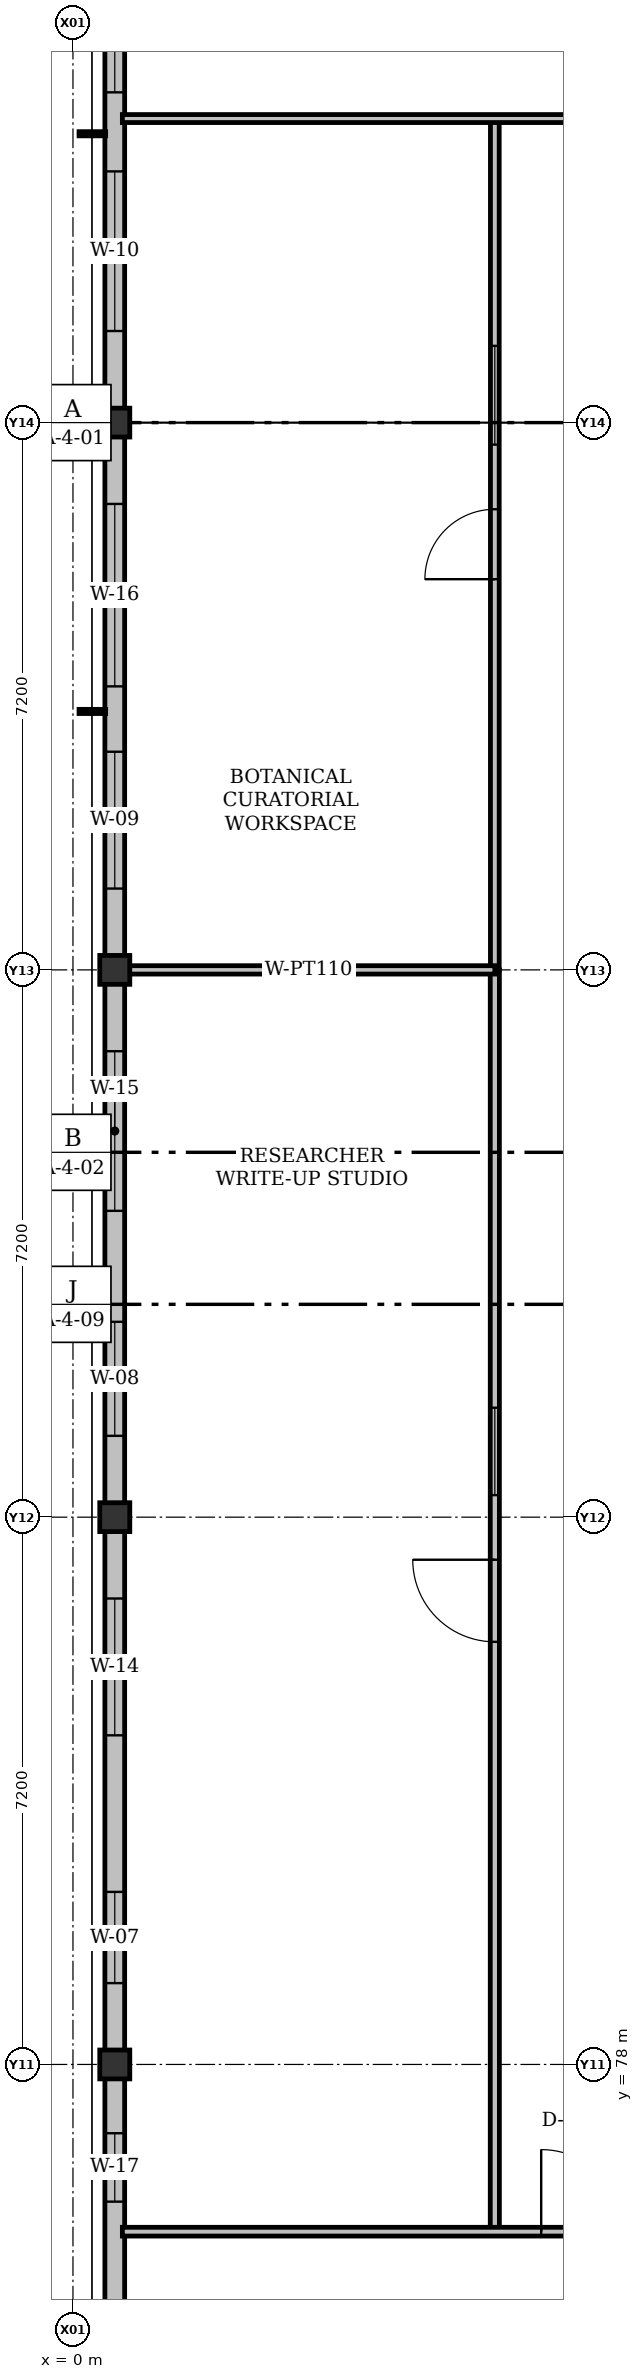
"""IFC4 building model, lengths in metres.
Left out: names, types, materials, properties, quantities, classifications, styles, units other than length and angle.
Written with IfcOpenShell. Run it as: python <this file> out.ifc"""

import sys

from ifc_helpers import new_model, si_unit, direction, frame, frame_2d, origin, origin_2d, place, context, subcontext, project, spatial, rectangle, i_section, extrude, element, fill, save


model = new_model("IFC4")
c1 = context("Model", 3, precision=1e-05, world=origin(), true_north=direction((0.0, 1.0)))
c2 = subcontext(c1, "Body", "Model", "MODEL_VIEW")
j1 = project(units=[si_unit("LENGTHUNIT", "METRE"), si_unit("PLANEANGLEUNIT", "RADIAN")], contexts=[c1])
p1 = place(None, origin())
s1 = spatial("IfcSite", under=j1, at=p1, CompositionType="ELEMENT")
p2 = place(p1, origin())
s2 = spatial("IfcBuilding", under=s1, at=p2, CompositionType="ELEMENT")
p3 = place(p2, frame((0.0, 0.0, 18.3)))
s3 = spatial("IfcBuildingStorey", under=s2, at=p3, CompositionType="ELEMENT", Elevation=18.3)
for number, where, z_axis, x_axis in (
    (1, (0.55, 78.0, 0.0), (0.0, 0.0, 1.0), (1.0, 0.0, 0.0)),
    (2, (0.55, 85.2, 0.0), (0.0, 0.0, 1.0), (1.0, 0.0, 0.0)),
    (3, (0.55, 92.4, 0.0), (0.0, 0.0, 1.0), (1.0, 0.0, 0.0)),
    (4, (0.55, 99.6, 0.0), (0.0, 0.0, 1.0), (1.0, 0.0, 0.0)),
):
    element("IfcColumn", number, at=place(p3, frame(where, z_axis=z_axis, x_axis=x_axis)), inside=s3, PredefinedType="COLUMN", context=c2, shape_type="SweptSolid", body=[
        extrude(i_section(OverallWidth=0.395, OverallDepth=0.38, WebThickness=0.019, FlangeThickness=0.03, FilletRadius=0.015, at=origin_2d()), origin(), (0.0, 0.0, 1.0), 4.2),
    ])
p4 = place(p3, frame((0.55, 70.5, 0.0), z_axis=(0.0, 0.0, 1.0), x_axis=(0.0, 1.0, 0.0)))
e5 = element("IfcWall", 5, at=p4, inside=s3, PredefinedType="SOLIDWALL", context=c2, shape_type="SweptSolid", body=[
    extrude(rectangle(XDim=7.5, YDim=0.26, at=frame_2d((3.75, 0.0))), origin(), (0.0, 0.0, 1.0), 3.577),
])
p5 = place(p4, frame((1.855, 0.0, 0.92)))
e6 = element("IfcOpeningElement", 6, at=p5, cuts=e5, PredefinedType="OPENING", context=c2, shape_type="SweptSolid", body=[
    extrude(rectangle(XDim=2.1, YDim=1.4, at=frame_2d((1.05, 0.7))), frame((0.0, 0.13, 0.0), z_axis=(0.0, -1.0, 0.0), x_axis=(1.0, 0.0, 0.0)), (0.0, 0.0, 1.0), 0.26),
])
p6 = place(p4, frame((5.695, 0.0, 0.92)))
e7 = element("IfcOpeningElement", 7, at=p6, cuts=e5, PredefinedType="OPENING", context=c2, shape_type="SweptSolid", body=[
    extrude(rectangle(XDim=0.9, YDim=1.3, at=frame_2d((0.45, 0.65))), frame((0.0, 0.13, 0.0), z_axis=(0.0, -1.0, 0.0), x_axis=(1.0, 0.0, 0.0)), (0.0, 0.0, 1.0), 0.26),
])
p7 = place(p3, frame((0.55, 78.0, 0.0), z_axis=(0.0, 0.0, 1.0), x_axis=(0.0, 1.0, 0.0)))
e8 = element("IfcWall", 8, at=p7, inside=s3, PredefinedType="SOLIDWALL", context=c2, shape_type="SweptSolid", body=[
    extrude(rectangle(XDim=7.2, YDim=0.26, at=frame_2d((3.6, 0.0))), origin(), (0.0, 0.0, 1.0), 3.577),
])
p8 = place(p7, frame((1.07, 0.0, 0.92)))
e9 = element("IfcOpeningElement", 9, at=p8, cuts=e8, PredefinedType="OPENING", context=c2, shape_type="SweptSolid", body=[
    extrude(rectangle(XDim=1.2, YDim=1.55, at=frame_2d((0.6, 0.775))), frame((0.0, 0.13, 0.0), z_axis=(0.0, -1.0, 0.0), x_axis=(1.0, 0.0, 0.0)), (0.0, 0.0, 1.0), 0.26),
])
p9 = place(p7, frame((4.33, 0.0, 0.92)))
e10 = element("IfcOpeningElement", 10, at=p9, cuts=e8, PredefinedType="OPENING", context=c2, shape_type="SweptSolid", body=[
    extrude(rectangle(XDim=1.8, YDim=1.7, at=frame_2d((0.9, 0.85))), frame((0.0, 0.13, 0.0), z_axis=(0.0, -1.0, 0.0), x_axis=(1.0, 0.0, 0.0)), (0.0, 0.0, 1.0), 0.26),
])
p10 = place(p3, frame((0.55, 85.2, 0.0), z_axis=(0.0, 0.0, 1.0), x_axis=(0.0, 1.0, 0.0)))
e11 = element("IfcWall", 11, at=p10, inside=s3, PredefinedType="SOLIDWALL", context=c2, shape_type="SweptSolid", body=[
    extrude(rectangle(XDim=7.2, YDim=0.26, at=frame_2d((3.6, 0.0))), origin(), (0.0, 0.0, 1.0), 3.577),
])
p11 = place(p10, frame((1.07, 0.0, 0.92)))
e12 = element("IfcOpeningElement", 12, at=p11, cuts=e11, PredefinedType="OPENING", context=c2, shape_type="SweptSolid", body=[
    extrude(rectangle(XDim=1.5, YDim=1.55, at=frame_2d((0.75, 0.775))), frame((0.0, 0.13, 0.0), z_axis=(0.0, -1.0, 0.0), x_axis=(1.0, 0.0, 0.0)), (0.0, 0.0, 1.0), 0.26),
])
p12 = place(p10, frame((4.03, 0.0, 0.92)))
e13 = element("IfcOpeningElement", 13, at=p12, cuts=e11, PredefinedType="OPENING", context=c2, shape_type="SweptSolid", body=[
    extrude(rectangle(XDim=2.1, YDim=1.7, at=frame_2d((1.05, 0.85))), frame((0.0, 0.13, 0.0), z_axis=(0.0, -1.0, 0.0), x_axis=(1.0, 0.0, 0.0)), (0.0, 0.0, 1.0), 0.26),
])
p13 = place(p3, frame((0.55, 92.4, 0.0), z_axis=(0.0, 0.0, 1.0), x_axis=(0.0, 1.0, 0.0)))
e14 = element("IfcWall", 14, at=p13, inside=s3, PredefinedType="SOLIDWALL", context=c2, shape_type="SweptSolid", body=[
    extrude(rectangle(XDim=7.2, YDim=0.26, at=frame_2d((3.6, 0.0))), origin(), (0.0, 0.0, 1.0), 3.577),
])
p14 = place(p13, frame((1.07, 0.0, 0.92)))
e15 = element("IfcOpeningElement", 15, at=p14, cuts=e14, PredefinedType="OPENING", context=c2, shape_type="SweptSolid", body=[
    extrude(rectangle(XDim=1.8, YDim=1.55, at=frame_2d((0.9, 0.775))), frame((0.0, 0.13, 0.0), z_axis=(0.0, -1.0, 0.0), x_axis=(1.0, 0.0, 0.0)), (0.0, 0.0, 1.0), 0.26),
])
p15 = place(p13, frame((3.73, 0.0, 0.92)))
e16 = element("IfcOpeningElement", 16, at=p15, cuts=e14, PredefinedType="OPENING", context=c2, shape_type="SweptSolid", body=[
    extrude(rectangle(XDim=2.4, YDim=1.7, at=frame_2d((1.2, 0.85))), frame((0.0, 0.13, 0.0), z_axis=(0.0, -1.0, 0.0), x_axis=(1.0, 0.0, 0.0)), (0.0, 0.0, 1.0), 0.26),
])
p16 = place(p3, frame((0.55, 99.6, 0.0), z_axis=(0.0, 0.0, 1.0), x_axis=(0.0, 1.0, 0.0)))
e17 = element("IfcWall", 17, at=p16, inside=s3, PredefinedType="SOLIDWALL", context=c2, shape_type="SweptSolid", body=[
    extrude(rectangle(XDim=7.2, YDim=0.26, at=frame_2d((3.6, 0.0))), origin(), (0.0, 0.0, 1.0), 3.577),
])
p17 = place(p16, frame((1.205, 0.0, 0.92)))
e18 = element("IfcOpeningElement", 18, at=p17, cuts=e17, PredefinedType="OPENING", context=c2, shape_type="SweptSolid", body=[
    extrude(rectangle(XDim=2.1, YDim=1.55, at=frame_2d((1.05, 0.775))), frame((0.0, 0.13, 0.0), z_axis=(0.0, -1.0, 0.0), x_axis=(1.0, 0.0, 0.0)), (0.0, 0.0, 1.0), 0.26),
])
p18 = place(p16, frame((4.345, 0.0, 0.92)))
e19 = element("IfcOpeningElement", 19, at=p18, cuts=e17, PredefinedType="OPENING", context=c2, shape_type="SweptSolid", body=[
    extrude(rectangle(XDim=2.0, YDim=1.35, at=frame_2d((1.0, 0.675))), frame((0.0, 0.13, 0.0), z_axis=(0.0, -1.0, 0.0), x_axis=(1.0, 0.0, 0.0)), (0.0, 0.0, 1.0), 0.26),
])
p19 = place(p3, frame((5.55, 75.8, 0.0), z_axis=(0.0, 0.0, 1.0), x_axis=(0.0, 1.0, 0.0)))
e20 = element("IfcWall", 20, at=p19, inside=s3, PredefinedType="PARTITIONING", context=c2, shape_type="SweptSolid", body=[
    extrude(rectangle(XDim=16.6, YDim=0.12, at=frame_2d((8.3, 0.0))), origin(), (0.0, 0.0, 1.0), 3.451),
])
p20 = place(p19, frame((7.76, 0.0, 0.0)))
e21 = element("IfcOpeningElement", 21, at=p20, cuts=e20, PredefinedType="OPENING", context=c2, shape_type="SweptSolid", body=[
    extrude(rectangle(XDim=1.08, YDim=2.1, at=frame_2d((0.54, 1.05))), frame((0.0, 0.06, 0.0), z_axis=(0.0, -1.0, 0.0), x_axis=(1.0, 0.0, 0.0)), (0.0, 0.0, 1.0), 0.12),
])
p21 = place(p19, frame((9.69, 0.0, 0.92)))
e22 = element("IfcOpeningElement", 22, at=p21, cuts=e20, PredefinedType="OPENING", context=c2, shape_type="SweptSolid", body=[
    extrude(rectangle(XDim=1.15, YDim=1.3, at=frame_2d((0.575, 0.65))), frame((0.0, 0.06, 0.0), z_axis=(0.0, -1.0, 0.0), x_axis=(1.0, 0.0, 0.0)), (0.0, 0.0, 1.0), 0.12),
])
p22 = place(p3, frame((5.55, 92.4, 0.0), z_axis=(0.0, 0.0, 1.0), x_axis=(0.0, 1.0, 0.0)))
e23 = element("IfcWall", 23, at=p22, inside=s3, PredefinedType="PARTITIONING", context=c2, shape_type="SweptSolid", body=[
    extrude(rectangle(XDim=11.2, YDim=0.115, at=frame_2d((5.6, 0.0))), origin(), (0.0, 0.0, 1.0), 3.451),
])
p23 = place(p22, frame((5.14, 0.0, 0.0)))
e24 = element("IfcOpeningElement", 24, at=p23, cuts=e23, PredefinedType="OPENING", context=c2, shape_type="SweptSolid", body=[
    extrude(rectangle(XDim=0.92, YDim=2.15, at=frame_2d((0.46, 1.075))), frame((0.0, 0.058, 0.0), z_axis=(0.0, -1.0, 0.0), x_axis=(1.0, 0.0, 0.0)), (0.0, 0.0, 1.0), 0.115),
])
p24 = place(p22, frame((6.91, 0.0, 0.92)))
e25 = element("IfcOpeningElement", 25, at=p24, cuts=e23, PredefinedType="OPENING", context=c2, shape_type="SweptSolid", body=[
    extrude(rectangle(XDim=1.3, YDim=1.3, at=frame_2d((0.65, 0.65))), frame((0.0, 0.058, 0.0), z_axis=(0.0, -1.0, 0.0), x_axis=(1.0, 0.0, 0.0)), (0.0, 0.0, 1.0), 0.115),
])
p25 = place(p3, frame((0.65, 92.4, 0.0), z_axis=(0.0, 0.0, 1.0), x_axis=(1.0, 0.0, 0.0)))
e26 = element("IfcWall", 26, at=p25, inside=s3, PredefinedType="PARTITIONING", context=c2, shape_type="SweptSolid", body=[
    extrude(rectangle(XDim=4.9, YDim=0.11, at=frame_2d((2.45, 0.0))), origin(), (0.0, 0.0, 1.0), 3.451),
])
p26 = place(p3, frame((0.65, 103.6, 0.0), z_axis=(0.0, 0.0, 1.0), x_axis=(1.0, 0.0, 0.0)))
e27 = element("IfcWall", 27, at=p26, inside=s3, PredefinedType="PARTITIONING", context=c2, shape_type="SweptSolid", body=[
    extrude(rectangle(XDim=28.265, YDim=0.105, at=frame_2d((14.133, 0.0))), origin(), (0.0, 0.0, 1.0), 3.527),
])
p27 = place(p26, frame((9.47, 0.0, 0.0)))
e28 = element("IfcOpeningElement", 28, at=p27, cuts=e27, PredefinedType="OPENING", context=c2, shape_type="SweptSolid", body=[
    extrude(rectangle(XDim=0.96, YDim=2.15, at=frame_2d((0.48, 1.075))), frame((0.0, 0.052, 0.0), z_axis=(0.0, -1.0, 0.0), x_axis=(1.0, 0.0, 0.0)), (0.0, 0.0, 1.0), 0.105),
])
p28 = place(p26, frame((11.28, 0.0, 0.92)))
e29 = element("IfcOpeningElement", 29, at=p28, cuts=e27, PredefinedType="OPENING", context=c2, shape_type="SweptSolid", body=[
    extrude(rectangle(XDim=1.45, YDim=1.3, at=frame_2d((0.725, 0.65))), frame((0.0, 0.052, 0.0), z_axis=(0.0, -1.0, 0.0), x_axis=(1.0, 0.0, 0.0)), (0.0, 0.0, 1.0), 0.105),
])
p29 = place(p3, frame((0.65, 75.8, 0.0), z_axis=(0.0, 0.0, 1.0), x_axis=(1.0, 0.0, 0.0)))
e30 = element("IfcWall", 30, at=p29, inside=s3, PredefinedType="PARTITIONING", context=c2, shape_type="SweptSolid", body=[
    extrude(rectangle(XDim=7.2, YDim=0.115, at=frame_2d((3.6, 0.0))), origin(), (0.0, 0.0, 1.0), 3.527),
])
p30 = place(p29, frame((5.51, 0.0, 0.0)))
e31 = element("IfcOpeningElement", 31, at=p30, cuts=e30, PredefinedType="OPENING", context=c2, shape_type="SweptSolid", body=[
    extrude(rectangle(XDim=1.08, YDim=2.15, at=frame_2d((0.54, 1.075))), frame((0.0, 0.058, 0.0), z_axis=(0.0, -1.0, 0.0), x_axis=(1.0, 0.0, 0.0)), (0.0, 0.0, 1.0), 0.115),
])
p31 = place(p6, origin())
e32 = element("IfcWindow", 32, at=p31, inside=s3, PartitioningType="SINGLE_PANEL", PredefinedType="WINDOW", context=c2, shape_type="SweptSolid", body=[
    extrude(rectangle(XDim=0.9, YDim=1.3, at=frame_2d((0.45, 0.65))), frame((0.0, 0.03, 0.0), z_axis=(0.0, -1.0, 0.0), x_axis=(1.0, 0.0, 0.0)), (0.0, 0.0, 1.0), 0.06),
])
fill(e7, e32)
p32 = place(p8, origin())
e33 = element("IfcWindow", 33, at=p32, inside=s3, PartitioningType="SINGLE_PANEL", PredefinedType="WINDOW", context=c2, shape_type="SweptSolid", body=[
    extrude(rectangle(XDim=1.2, YDim=1.55, at=frame_2d((0.6, 0.775))), frame((0.0, 0.03, 0.0), z_axis=(0.0, -1.0, 0.0), x_axis=(1.0, 0.0, 0.0)), (0.0, 0.0, 1.0), 0.06),
])
fill(e9, e33)
p33 = place(p9, origin())
e34 = element("IfcWindow", 34, at=p33, inside=s3, PartitioningType="DOUBLE_PANEL_VERTICAL", PredefinedType="WINDOW", context=c2, shape_type="SweptSolid", body=[
    extrude(rectangle(XDim=1.8, YDim=1.7, at=frame_2d((0.9, 0.85))), frame((0.0, 0.03, 0.0), z_axis=(0.0, -1.0, 0.0), x_axis=(1.0, 0.0, 0.0)), (0.0, 0.0, 1.0), 0.06),
])
fill(e10, e34)
p34 = place(p11, origin())
e35 = element("IfcWindow", 35, at=p34, inside=s3, PartitioningType="SINGLE_PANEL", PredefinedType="WINDOW", context=c2, shape_type="SweptSolid", body=[
    extrude(rectangle(XDim=1.5, YDim=1.55, at=frame_2d((0.75, 0.775))), frame((0.0, 0.03, 0.0), z_axis=(0.0, -1.0, 0.0), x_axis=(1.0, 0.0, 0.0)), (0.0, 0.0, 1.0), 0.06),
])
fill(e12, e35)
p35 = place(p12, origin())
e36 = element("IfcWindow", 36, at=p35, inside=s3, PartitioningType="DOUBLE_PANEL_VERTICAL", PredefinedType="WINDOW", context=c2, shape_type="SweptSolid", body=[
    extrude(rectangle(XDim=2.1, YDim=1.7, at=frame_2d((1.05, 0.85))), frame((0.0, 0.03, 0.0), z_axis=(0.0, -1.0, 0.0), x_axis=(1.0, 0.0, 0.0)), (0.0, 0.0, 1.0), 0.06),
])
fill(e13, e36)
p36 = place(p14, origin())
e37 = element("IfcWindow", 37, at=p36, inside=s3, PartitioningType="DOUBLE_PANEL_VERTICAL", PredefinedType="WINDOW", context=c2, shape_type="SweptSolid", body=[
    extrude(rectangle(XDim=1.8, YDim=1.55, at=frame_2d((0.9, 0.775))), frame((0.0, 0.03, 0.0), z_axis=(0.0, -1.0, 0.0), x_axis=(1.0, 0.0, 0.0)), (0.0, 0.0, 1.0), 0.06),
])
fill(e15, e37)
p37 = place(p15, origin())
e38 = element("IfcWindow", 38, at=p37, inside=s3, PartitioningType="DOUBLE_PANEL_VERTICAL", PredefinedType="WINDOW", context=c2, shape_type="SweptSolid", body=[
    extrude(rectangle(XDim=2.4, YDim=1.7, at=frame_2d((1.2, 0.85))), frame((0.0, 0.03, 0.0), z_axis=(0.0, -1.0, 0.0), x_axis=(1.0, 0.0, 0.0)), (0.0, 0.0, 1.0), 0.06),
])
fill(e16, e38)
p38 = place(p17, origin())
e39 = element("IfcWindow", 39, at=p38, inside=s3, PartitioningType="DOUBLE_PANEL_VERTICAL", PredefinedType="WINDOW", context=c2, shape_type="SweptSolid", body=[
    extrude(rectangle(XDim=2.1, YDim=1.55, at=frame_2d((1.05, 0.775))), frame((0.0, 0.03, 0.0), z_axis=(0.0, -1.0, 0.0), x_axis=(1.0, 0.0, 0.0)), (0.0, 0.0, 1.0), 0.06),
])
fill(e18, e39)
p39 = place(p18, origin())
e40 = element("IfcWindow", 40, at=p39, inside=s3, PartitioningType="DOUBLE_PANEL_VERTICAL", PredefinedType="WINDOW", context=c2, shape_type="SweptSolid", body=[
    extrude(rectangle(XDim=2.0, YDim=1.35, at=frame_2d((1.0, 0.675))), frame((0.0, 0.03, 0.0), z_axis=(0.0, -1.0, 0.0), x_axis=(1.0, 0.0, 0.0)), (0.0, 0.0, 1.0), 0.06),
])
fill(e19, e40)
p40 = place(p20, origin())
e41 = element("IfcDoor", 41, at=p40, inside=s3, OperationType="SINGLE_SWING_RIGHT", PredefinedType="DOOR", context=c2, shape_type="SweptSolid", body=[
    extrude(rectangle(XDim=1.08, YDim=2.1, at=frame_2d((0.54, 1.05))), frame((0.0, 0.025, 0.0), z_axis=(0.0, -1.0, 0.0), x_axis=(1.0, 0.0, 0.0)), (0.0, 0.0, 1.0), 0.05),
])
fill(e21, e41)
p41 = place(p21, origin())
e42 = element("IfcWindow", 42, at=p41, inside=s3, PartitioningType="SINGLE_PANEL", PredefinedType="WINDOW", context=c2, shape_type="SweptSolid", body=[
    extrude(rectangle(XDim=1.15, YDim=1.3, at=frame_2d((0.575, 0.65))), frame((0.0, 0.03, 0.0), z_axis=(0.0, -1.0, 0.0), x_axis=(1.0, 0.0, 0.0)), (0.0, 0.0, 1.0), 0.06),
])
fill(e22, e42)
p42 = place(p23, origin())
e43 = element("IfcDoor", 43, at=p42, inside=s3, OperationType="SINGLE_SWING_LEFT", PredefinedType="DOOR", context=c2, shape_type="SweptSolid", body=[
    extrude(rectangle(XDim=0.92, YDim=2.15, at=frame_2d((0.46, 1.075))), frame((0.0, 0.025, 0.0), z_axis=(0.0, -1.0, 0.0), x_axis=(1.0, 0.0, 0.0)), (0.0, 0.0, 1.0), 0.05),
])
fill(e24, e43)
p43 = place(p24, origin())
e44 = element("IfcWindow", 44, at=p43, inside=s3, PartitioningType="SINGLE_PANEL", PredefinedType="WINDOW", context=c2, shape_type="SweptSolid", body=[
    extrude(rectangle(XDim=1.3, YDim=1.3, at=frame_2d((0.65, 0.65))), frame((0.0, 0.03, 0.0), z_axis=(0.0, -1.0, 0.0), x_axis=(1.0, 0.0, 0.0)), (0.0, 0.0, 1.0), 0.06),
])
fill(e25, e44)
p44 = place(p30, origin())
e45 = element("IfcDoor", 45, at=p44, inside=s3, OperationType="SINGLE_SWING_LEFT", PredefinedType="DOOR", context=c2, shape_type="SweptSolid", body=[
    extrude(rectangle(XDim=1.08, YDim=2.15, at=frame_2d((0.54, 1.075))), frame((0.0, 0.025, 0.0), z_axis=(0.0, -1.0, 0.0), x_axis=(1.0, 0.0, 0.0)), (0.0, 0.0, 1.0), 0.05),
])
fill(e31, e45)
save(model, sys.argv[1])
